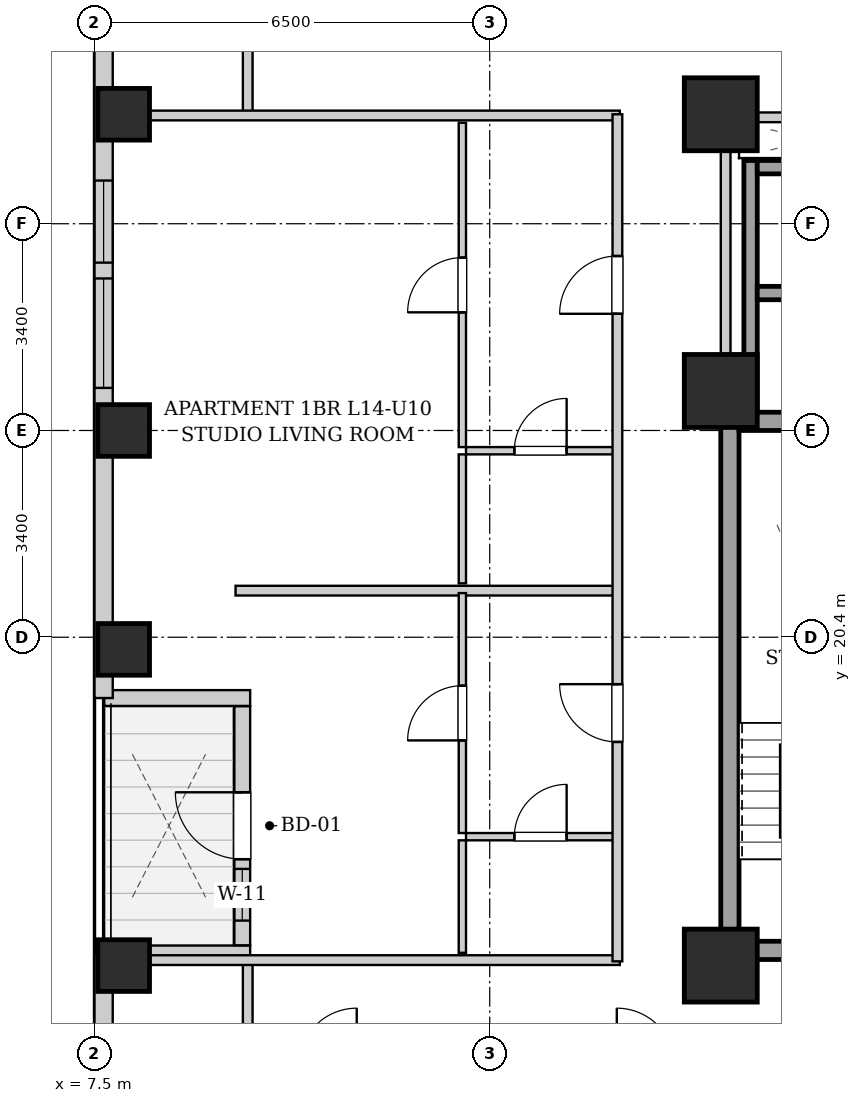
"""IFC4 building model, lengths in metres.
Left out: names, types, materials, properties, quantities, classifications, styles, units other than length and angle.
Written with IfcOpenShell. Run it as: python <this file> out.ifc"""

import sys

from ifc_helpers import new_model, si_unit, direction, frame, frame_2d, origin, origin_2d, place, context, subcontext, project, spatial, rectangle, extrude, element, fill, save


model = new_model("IFC4")
c1 = context("Model", 3, precision=1e-05, world=origin(), true_north=direction((0.0, 1.0)))
c2 = subcontext(c1, "Body", "Model", "MODEL_VIEW")
j1 = project(units=[si_unit("LENGTHUNIT", "METRE"), si_unit("PLANEANGLEUNIT", "RADIAN")], contexts=[c1])
p1 = place(None, origin())
s1 = spatial("IfcSite", under=j1, at=p1, CompositionType="ELEMENT")
p2 = place(p1, origin())
s2 = spatial("IfcBuilding", under=s1, at=p2, CompositionType="ELEMENT")
p3 = place(p2, frame((0.0, 0.0, 54.6)))
s3 = spatial("IfcBuildingStorey", under=s2, at=p3, CompositionType="ELEMENT", Elevation=54.6)
for number, where, z_axis, x_axis in (
    (1, (7.98, 15.0, 0.0), (0.0, 0.0, 1.0), (1.0, 0.0, 0.0)),
    (2, (7.98, 20.2, 0.0), (0.0, 0.0, 1.0), (1.0, 0.0, 0.0)),
    (3, (7.98, 23.8, 0.0), (0.0, 0.0, 1.0), (1.0, 0.0, 0.0)),
    (4, (7.98, 29.0, 0.0), (0.0, 0.0, 1.0), (1.0, 0.0, 0.0)),
):
    element("IfcColumn", number, at=place(p3, frame(where, z_axis=z_axis, x_axis=x_axis)), inside=s3, PredefinedType="COLUMN", context=c2, shape_type="SweptSolid", body=[
        extrude(rectangle(XDim=0.85, YDim=0.85, at=origin_2d()), origin(), (0.0, 0.0, 1.0), 3.2),
    ])
for number, where, z_axis, x_axis in (
    (5, (17.8, 15.0, 0.0), (0.0, 0.0, 1.0), (1.0, 0.0, 0.0)),
    (6, (17.8, 29.0, 0.0), (0.0, 0.0, 1.0), (1.0, 0.0, 0.0)),
    (7, (17.8, 24.45, 0.0), (0.0, 0.0, 1.0), (1.0, 0.0, 0.0)),
):
    element("IfcColumn", number, at=place(p3, frame(where, z_axis=z_axis, x_axis=x_axis)), inside=s3, PredefinedType="COLUMN", context=c2, shape_type="SweptSolid", body=[
        extrude(rectangle(XDim=1.2, YDim=1.2, at=origin_2d()), origin(), (0.0, 0.0, 1.0), 3.2),
    ])
p4 = place(p3, frame((7.65, 2.5, 0.0), z_axis=(0.0, 0.0, 1.0), x_axis=(0.0, 1.0, 0.0)))
e8 = element("IfcWall", 8, at=p4, inside=s3, PredefinedType="SOLIDWALL", context=c2, shape_type="SweptSolid", body=[
    extrude(rectangle(XDim=12.7, YDim=0.3, at=frame_2d((6.35, 0.0))), origin(), (0.0, 0.0, 1.0), 1.975),
])
p5 = place(p4, frame((3.257, 0.0, 0.55)))
e9 = element("IfcOpeningElement", 9, at=p5, cuts=e8, PredefinedType="OPENING", context=c2, shape_type="SweptSolid", body=[
    extrude(rectangle(XDim=1.8, YDim=1.2, at=frame_2d((0.9, 0.6))), frame((0.0, 0.16, 0.0), z_axis=(0.0, -1.0, 0.0), x_axis=(1.0, 0.0, 0.0)), (0.0, 0.0, 1.0), 0.32),
])
p6 = place(p4, frame((1.185, 0.0, 0.55)))
e10 = element("IfcOpeningElement", 10, at=p6, cuts=e8, PredefinedType="OPENING", context=c2, shape_type="SweptSolid", body=[
    extrude(rectangle(XDim=1.35, YDim=1.2, at=frame_2d((0.675, 0.6))), frame((0.0, 0.16, 0.0), z_axis=(0.0, -1.0, 0.0), x_axis=(1.0, 0.0, 0.0)), (0.0, 0.0, 1.0), 0.32),
])
p7 = place(p3, frame((7.66, 15.2, 0.0), z_axis=(0.0, 0.0, 1.0), x_axis=(1.0, 0.0, 0.0)))
e11 = element("IfcWall", 11, at=p7, inside=s3, PredefinedType="SOLIDWALL", context=c2, shape_type="SweptSolid", body=[
    extrude(rectangle(XDim=2.4, YDim=0.26, at=frame_2d((1.2, 0.0))), origin(), (0.0, 0.0, 1.0), 2.94),
])
p8 = place(p3, frame((9.93, 15.334, 0.0), z_axis=(0.0, 0.0, 1.0), x_axis=(0.0, 1.0, 0.0)))
e12 = element("IfcWall", 12, at=p8, inside=s3, PredefinedType="SOLIDWALL", context=c2, shape_type="SweptSolid", body=[
    extrude(rectangle(XDim=3.932, YDim=0.26, at=frame_2d((1.966, 0.0))), origin(), (0.0, 0.0, 1.0), 2.94),
])
p9 = place(p8, frame((1.416, 0.0, 0.0)))
e13 = element("IfcOpeningElement", 13, at=p9, cuts=e12, PredefinedType="OPENING", context=c2, shape_type="SweptSolid", body=[
    extrude(rectangle(XDim=1.1, YDim=2.0, at=frame_2d((0.55, 1.0))), frame((0.0, 0.14, 0.0), z_axis=(0.0, -1.0, 0.0), x_axis=(1.0, 0.0, 0.0)), (0.0, 0.0, 1.0), 0.28),
])
p10 = place(p8, frame((0.406, 0.0, 0.55)))
e14 = element("IfcOpeningElement", 14, at=p10, cuts=e12, PredefinedType="OPENING", context=c2, shape_type="SweptSolid", body=[
    extrude(rectangle(XDim=0.85, YDim=1.2, at=frame_2d((0.425, 0.6))), frame((0.0, 0.14, 0.0), z_axis=(0.0, -1.0, 0.0), x_axis=(1.0, 0.0, 0.0)), (0.0, 0.0, 1.0), 0.28),
])
p11 = place(p3, frame((10.06, 19.4, 0.0), z_axis=(0.0, 0.0, 1.0), x_axis=(-1.0, 0.0, 0.0)))
e15 = element("IfcWall", 15, at=p11, inside=s3, PredefinedType="SOLIDWALL", context=c2, shape_type="SweptSolid", body=[
    extrude(rectangle(XDim=2.4, YDim=0.26, at=frame_2d((1.2, 0.0))), origin(), (0.0, 0.0, 1.0), 2.94),
])
p12 = place(p3, frame((7.65, 19.4, 0.0), z_axis=(0.0, 0.0, 1.0), x_axis=(0.0, 1.0, 0.0)))
e16 = element("IfcWall", 16, at=p12, inside=s3, PredefinedType="SOLIDWALL", context=c2, shape_type="SweptSolid", body=[
    extrude(rectangle(XDim=25.7, YDim=0.3, at=frame_2d((12.85, 0.0))), origin(), (0.0, 0.0, 1.0), 1.975),
])
p13 = place(p12, frame((20.185, 0.0, 0.55)))
e17 = element("IfcOpeningElement", 17, at=p13, cuts=e16, PredefinedType="OPENING", context=c2, shape_type="SweptSolid", body=[
    extrude(rectangle(XDim=1.8, YDim=1.2, at=frame_2d((0.9, 0.6))), frame((0.0, 0.16, 0.0), z_axis=(0.0, -1.0, 0.0), x_axis=(1.0, 0.0, 0.0)), (0.0, 0.0, 1.0), 0.32),
])
p14 = place(p12, frame((14.585, 0.0, 0.55)))
e18 = element("IfcOpeningElement", 18, at=p14, cuts=e16, PredefinedType="OPENING", context=c2, shape_type="SweptSolid", body=[
    extrude(rectangle(XDim=1.35, YDim=1.2, at=frame_2d((0.675, 0.6))), frame((0.0, 0.16, 0.0), z_axis=(0.0, -1.0, 0.0), x_axis=(1.0, 0.0, 0.0)), (0.0, 0.0, 1.0), 0.32),
])
p15 = place(p12, frame((5.1, 0.0, 0.55)))
e19 = element("IfcOpeningElement", 19, at=p15, cuts=e16, PredefinedType="OPENING", context=c2, shape_type="SweptSolid", body=[
    extrude(rectangle(XDim=1.8, YDim=1.2, at=frame_2d((0.9, 0.6))), frame((0.0, 0.16, 0.0), z_axis=(0.0, -1.0, 0.0), x_axis=(1.0, 0.0, 0.0)), (0.0, 0.0, 1.0), 0.32),
])
p16 = place(p12, frame((7.16, 0.0, 0.55)))
e20 = element("IfcOpeningElement", 20, at=p16, cuts=e16, PredefinedType="OPENING", context=c2, shape_type="SweptSolid", body=[
    extrude(rectangle(XDim=1.35, YDim=1.2, at=frame_2d((0.675, 0.6))), frame((0.0, 0.16, 0.0), z_axis=(0.0, -1.0, 0.0), x_axis=(1.0, 0.0, 0.0)), (0.0, 0.0, 1.0), 0.32),
])
p17 = place(p3, frame((17.95, 15.1, 0.0), z_axis=(0.0, 0.0, 1.0), x_axis=(0.0, 1.0, 0.0)))
e21 = element("IfcWall", 21, at=p17, inside=s3, PredefinedType="SHEAR", context=c2, shape_type="SweptSolid", body=[
    extrude(rectangle(XDim=9.0, YDim=0.3, at=frame_2d((4.5, 0.0))), origin(), (0.0, 0.0, 1.0), 2.94),
])
p18 = place(p3, frame((18.1, 23.95, 0.0), z_axis=(0.0, 0.0, 1.0), x_axis=(1.0, 0.0, 0.0)))
e22 = element("IfcWall", 22, at=p18, inside=s3, PredefinedType="SHEAR", context=c2, shape_type="SweptSolid", body=[
    extrude(rectangle(XDim=2.85, YDim=0.3, at=frame_2d((1.425, 0.0))), origin(), (0.0, 0.0, 1.0), 2.94),
])
p19 = place(p3, frame((18.1, 15.25, 0.0), z_axis=(0.0, 0.0, 1.0), x_axis=(1.0, 0.0, 0.0)))
e23 = element("IfcWall", 23, at=p19, inside=s3, PredefinedType="SHEAR", context=c2, shape_type="SweptSolid", body=[
    extrude(rectangle(XDim=2.85, YDim=0.3, at=frame_2d((1.425, 0.0))), origin(), (0.0, 0.0, 1.0), 2.94),
])
p20 = place(p19, frame((0.86, 0.0, 0.0)))
e24 = element("IfcOpeningElement", 24, at=p20, cuts=e23, PredefinedType="OPENING", context=c2, shape_type="SweptSolid", body=[
    extrude(rectangle(XDim=1.1, YDim=2.05, at=frame_2d((0.55, 1.025))), frame((0.0, 0.16, 0.0), z_axis=(0.0, -1.0, 0.0), x_axis=(1.0, 0.0, 0.0)), (0.0, 0.0, 1.0), 0.32),
])
p21 = place(p3, frame((18.29, 24.1, 0.0), z_axis=(0.0, 0.0, 1.0), x_axis=(0.0, 1.0, 0.0)))
e25 = element("IfcWall", 25, at=p21, inside=s3, PredefinedType="SHEAR", context=c2, shape_type="SweptSolid", body=[
    extrude(rectangle(XDim=4.14, YDim=0.22, at=frame_2d((2.07, 0.0))), origin(), (0.0, 0.0, 1.0), 2.94),
])
for number, where, z_axis, x_axis in (
    (26, (18.4, 26.06, 0.0), (0.0, 0.0, 1.0), (1.0, 0.0, 0.0)),
    (27, (18.4, 28.13, 0.0), (0.0, 0.0, 1.0), (1.0, 0.0, 0.0)),
):
    element("IfcWall", number, at=place(p3, frame(where, z_axis=z_axis, x_axis=x_axis)), inside=s3, PredefinedType="SHEAR", context=c2, shape_type="SweptSolid", body=[
        extrude(rectangle(XDim=1.9, YDim=0.22, at=frame_2d((0.95, 0.0))), origin(), (0.0, 0.0, 1.0), 2.94),
    ])
p22 = place(p3, frame((17.88, 24.12, 0.0), z_axis=(0.0, 0.0, 1.0), x_axis=(0.0, 1.0, 0.0)))
e28 = element("IfcWall", 28, at=p22, inside=s3, PredefinedType="PARTITIONING", context=c2, shape_type="SweptSolid", body=[
    extrude(rectangle(XDim=4.76, YDim=0.16, at=frame_2d((2.38, 0.0))), origin(), (0.0, 0.0, 1.0), 2.94),
])
p23 = place(p3, frame((17.96, 28.95, 0.0), z_axis=(0.0, 0.0, 1.0), x_axis=(1.0, 0.0, 0.0)))
e29 = element("IfcWall", 29, at=p23, inside=s3, PredefinedType="PARTITIONING", context=c2, shape_type="SweptSolid", body=[
    extrude(rectangle(XDim=4.29, YDim=0.16, at=frame_2d((2.145, 0.0))), origin(), (0.0, 0.0, 1.0), 2.232),
])
p24 = place(p23, frame((1.57, 0.0, 0.0)))
e30 = element("IfcOpeningElement", 30, at=p24, cuts=e29, PredefinedType="OPENING", context=c2, shape_type="SweptSolid", body=[
    extrude(rectangle(XDim=0.86, YDim=2.05, at=frame_2d((0.43, 1.025))), frame((0.0, 0.09, 0.0), z_axis=(0.0, -1.0, 0.0), x_axis=(1.0, 0.0, 0.0)), (0.0, 0.0, 1.0), 0.18),
])
for number, where, z_axis, x_axis in (
    (31, (10.02, 13.35, 0.0), (0.0, 0.0, 1.0), (0.0, 1.0, 0.0)),
    (32, (10.02, 28.98, 0.0), (0.0, 0.0, 1.0), (0.0, 1.0, 0.0)),
):
    element("IfcWall", number, at=place(p3, frame(where, z_axis=z_axis, x_axis=x_axis)), inside=s3, PredefinedType="PARTITIONING", context=c2, shape_type="SweptSolid", body=[
        extrude(rectangle(XDim=1.74, YDim=0.16, at=frame_2d((0.87, 0.0))), origin(), (0.0, 0.0, 1.0), 2.94),
    ])
for number, where, z_axis, x_axis in (
    (33, (7.78, 15.09, 0.0), (0.0, 0.0, 1.0), (1.0, 0.0, 0.0)),
    (34, (7.78, 28.98, 0.0), (0.0, 0.0, 1.0), (1.0, 0.0, 0.0)),
):
    element("IfcWall", number, at=place(p3, frame(where, z_axis=z_axis, x_axis=x_axis)), inside=s3, PredefinedType="PARTITIONING", context=c2, shape_type="SweptSolid", body=[
        extrude(rectangle(XDim=8.36, YDim=0.16, at=frame_2d((4.18, 0.0))), origin(), (0.0, 0.0, 1.0), 2.232),
    ])
p25 = place(p3, frame((9.82, 21.166, 0.0), z_axis=(0.0, 0.0, 1.0), x_axis=(1.0, 0.0, 0.0)))
e35 = element("IfcWall", 35, at=p25, inside=s3, PredefinedType="PARTITIONING", context=c2, shape_type="SweptSolid", body=[
    extrude(rectangle(XDim=6.24, YDim=0.16, at=frame_2d((3.12, 0.0))), origin(), (0.0, 0.0, 1.0), 2.94),
])
p26 = place(p3, frame((13.61, 17.12, 0.0), z_axis=(0.0, 0.0, 1.0), x_axis=(1.0, 0.0, 0.0)))
e36 = element("IfcWall", 36, at=p26, inside=s3, PredefinedType="PARTITIONING", context=c2, shape_type="SweptSolid", body=[
    extrude(rectangle(XDim=2.45, YDim=0.12, at=frame_2d((1.225, 0.0))), origin(), (0.0, 0.0, 1.0), 2.94),
])
p27 = place(p26, frame((0.795, 0.0, 0.0)))
e37 = element("IfcOpeningElement", 37, at=p27, cuts=e36, PredefinedType="OPENING", context=c2, shape_type="SweptSolid", body=[
    extrude(rectangle(XDim=0.86, YDim=2.05, at=frame_2d((0.43, 1.025))), frame((0.0, 0.07, 0.0), z_axis=(0.0, -1.0, 0.0), x_axis=(1.0, 0.0, 0.0)), (0.0, 0.0, 1.0), 0.14),
])
p28 = place(p3, frame((13.55, 15.21, 0.0), z_axis=(0.0, 0.0, 1.0), x_axis=(0.0, 1.0, 0.0)))
e38 = element("IfcWall", 38, at=p28, inside=s3, PredefinedType="PARTITIONING", context=c2, shape_type="SweptSolid", body=[
    extrude(rectangle(XDim=1.85, YDim=0.12, at=frame_2d((0.925, 0.0))), origin(), (0.0, 0.0, 1.0), 2.94),
])
p29 = place(p3, frame((13.55, 17.18, 0.0), z_axis=(0.0, 0.0, 1.0), x_axis=(0.0, 1.0, 0.0)))
e39 = element("IfcWall", 39, at=p29, inside=s3, PredefinedType="PARTITIONING", context=c2, shape_type="SweptSolid", body=[
    extrude(rectangle(XDim=3.946, YDim=0.12, at=frame_2d((1.973, 0.0))), origin(), (0.0, 0.0, 1.0), 2.94),
])
p30 = place(p29, frame((1.523, 0.0, 0.0)))
e40 = element("IfcOpeningElement", 40, at=p30, cuts=e39, PredefinedType="OPENING", context=c2, shape_type="SweptSolid", body=[
    extrude(rectangle(XDim=0.9, YDim=2.05, at=frame_2d((0.45, 1.025))), frame((0.0, 0.07, 0.0), z_axis=(0.0, -1.0, 0.0), x_axis=(1.0, 0.0, 0.0)), (0.0, 0.0, 1.0), 0.14),
])
p31 = place(p3, frame((13.61, 23.467, 0.0), z_axis=(0.0, 0.0, 1.0), x_axis=(1.0, 0.0, 0.0)))
e41 = element("IfcWall", 41, at=p31, inside=s3, PredefinedType="PARTITIONING", context=c2, shape_type="SweptSolid", body=[
    extrude(rectangle(XDim=2.45, YDim=0.12, at=frame_2d((1.225, 0.0))), origin(), (0.0, 0.0, 1.0), 2.94),
])
p32 = place(p31, frame((0.795, 0.0, 0.0)))
e42 = element("IfcOpeningElement", 42, at=p32, cuts=e41, PredefinedType="OPENING", context=c2, shape_type="SweptSolid", body=[
    extrude(rectangle(XDim=0.86, YDim=2.05, at=frame_2d((0.43, 1.025))), frame((0.0, 0.07, 0.0), z_axis=(0.0, -1.0, 0.0), x_axis=(1.0, 0.0, 0.0)), (0.0, 0.0, 1.0), 0.14),
])
p33 = place(p3, frame((13.55, 21.286, 0.0), z_axis=(0.0, 0.0, 1.0), x_axis=(0.0, 1.0, 0.0)))
e43 = element("IfcWall", 43, at=p33, inside=s3, PredefinedType="PARTITIONING", context=c2, shape_type="SweptSolid", body=[
    extrude(rectangle(XDim=2.121, YDim=0.12, at=frame_2d((1.061, 0.0))), origin(), (0.0, 0.0, 1.0), 2.94),
])
p34 = place(p3, frame((13.55, 23.527, 0.0), z_axis=(0.0, 0.0, 1.0), x_axis=(0.0, 1.0, 0.0)))
e44 = element("IfcWall", 44, at=p34, inside=s3, PredefinedType="PARTITIONING", context=c2, shape_type="SweptSolid", body=[
    extrude(rectangle(XDim=5.333, YDim=0.12, at=frame_2d((2.667, 0.0))), origin(), (0.0, 0.0, 1.0), 2.94),
])
p35 = place(p34, frame((2.216, 0.0, 0.0)))
e45 = element("IfcOpeningElement", 45, at=p35, cuts=e44, PredefinedType="OPENING", context=c2, shape_type="SweptSolid", body=[
    extrude(rectangle(XDim=0.9, YDim=2.05, at=frame_2d((0.45, 1.025))), frame((0.0, 0.07, 0.0), z_axis=(0.0, -1.0, 0.0), x_axis=(1.0, 0.0, 0.0)), (0.0, 0.0, 1.0), 0.14),
])
p36 = place(p3, frame((16.1, 15.07, 0.0), z_axis=(0.0, 0.0, 1.0), x_axis=(0.0, 1.0, 0.0)))
e46 = element("IfcWall", 46, at=p36, inside=s3, PredefinedType="PARTITIONING", context=c2, shape_type="SweptSolid", body=[
    extrude(rectangle(XDim=13.93, YDim=0.16, at=frame_2d((6.965, 0.0))), origin(), (0.0, 0.0, 1.0), 2.94),
])
p37 = place(p36, frame((3.608, 0.0, 0.0)))
e47 = element("IfcOpeningElement", 47, at=p37, cuts=e46, PredefinedType="OPENING", context=c2, shape_type="SweptSolid", body=[
    extrude(rectangle(XDim=0.95, YDim=2.1, at=frame_2d((0.475, 1.05))), frame((0.0, 0.09, 0.0), z_axis=(0.0, -1.0, 0.0), x_axis=(1.0, 0.0, 0.0)), (0.0, 0.0, 1.0), 0.18),
])
p38 = place(p36, frame((10.649, 0.0, 0.0)))
e48 = element("IfcOpeningElement", 48, at=p38, cuts=e46, PredefinedType="OPENING", context=c2, shape_type="SweptSolid", body=[
    extrude(rectangle(XDim=0.95, YDim=2.1, at=frame_2d((0.475, 1.05))), frame((0.0, 0.09, 0.0), z_axis=(0.0, -1.0, 0.0), x_axis=(1.0, 0.0, 0.0)), (0.0, 0.0, 1.0), 0.18),
])
p39 = place(p27, origin())
e49 = element("IfcDoor", 49, at=p39, inside=s3, OperationType="SINGLE_SWING_RIGHT", PredefinedType="DOOR", context=c2, shape_type="SweptSolid", body=[
    extrude(rectangle(XDim=0.86, YDim=2.05, at=frame_2d((0.43, 1.025))), frame((0.0, 0.025, 0.0), z_axis=(0.0, -1.0, 0.0), x_axis=(1.0, 0.0, 0.0)), (0.0, 0.0, 1.0), 0.05),
])
fill(e37, e49)
p40 = place(p30, origin())
e50 = element("IfcDoor", 50, at=p40, inside=s3, OperationType="SINGLE_SWING_LEFT", PredefinedType="DOOR", context=c2, shape_type="SweptSolid", body=[
    extrude(rectangle(XDim=0.9, YDim=2.05, at=frame_2d((0.45, 1.025))), frame((0.0, 0.025, 0.0), z_axis=(0.0, -1.0, 0.0), x_axis=(1.0, 0.0, 0.0)), (0.0, 0.0, 1.0), 0.05),
])
fill(e40, e50)
p41 = place(p32, origin())
e51 = element("IfcDoor", 51, at=p41, inside=s3, OperationType="SINGLE_SWING_RIGHT", PredefinedType="DOOR", context=c2, shape_type="SweptSolid", body=[
    extrude(rectangle(XDim=0.86, YDim=2.05, at=frame_2d((0.43, 1.025))), frame((0.0, 0.025, 0.0), z_axis=(0.0, -1.0, 0.0), x_axis=(1.0, 0.0, 0.0)), (0.0, 0.0, 1.0), 0.05),
])
fill(e42, e51)
p42 = place(p35, origin())
e52 = element("IfcDoor", 52, at=p42, inside=s3, OperationType="SINGLE_SWING_LEFT", PredefinedType="DOOR", context=c2, shape_type="SweptSolid", body=[
    extrude(rectangle(XDim=0.9, YDim=2.05, at=frame_2d((0.45, 1.025))), frame((0.0, 0.025, 0.0), z_axis=(0.0, -1.0, 0.0), x_axis=(1.0, 0.0, 0.0)), (0.0, 0.0, 1.0), 0.05),
])
fill(e45, e52)
p43 = place(p37, origin())
e53 = element("IfcDoor", 53, at=p43, inside=s3, OperationType="SINGLE_SWING_RIGHT", PredefinedType="DOOR", context=c2, shape_type="SweptSolid", body=[
    extrude(rectangle(XDim=0.95, YDim=2.1, at=frame_2d((0.475, 1.05))), frame((0.0, 0.025, 0.0), z_axis=(0.0, -1.0, 0.0), x_axis=(1.0, 0.0, 0.0)), (0.0, 0.0, 1.0), 0.05),
])
fill(e47, e53)
p44 = place(p38, origin())
e54 = element("IfcDoor", 54, at=p44, inside=s3, OperationType="SINGLE_SWING_LEFT", PredefinedType="DOOR", context=c2, shape_type="SweptSolid", body=[
    extrude(rectangle(XDim=0.95, YDim=2.1, at=frame_2d((0.475, 1.05))), frame((0.0, 0.025, 0.0), z_axis=(0.0, -1.0, 0.0), x_axis=(1.0, 0.0, 0.0)), (0.0, 0.0, 1.0), 0.05),
])
fill(e48, e54)
p45 = place(p9, origin())
e55 = element("IfcDoor", 55, at=p45, inside=s3, OperationType="SINGLE_SWING_RIGHT", PredefinedType="DOOR", context=c2, shape_type="SweptSolid", body=[
    extrude(rectangle(XDim=1.1, YDim=2.0, at=frame_2d((0.55, 1.0))), frame((0.0, 0.025, 0.0), z_axis=(0.0, -1.0, 0.0), x_axis=(1.0, 0.0, 0.0)), (0.0, 0.0, 1.0), 0.05),
])
fill(e13, e55)
p46 = place(p10, origin())
e56 = element("IfcWindow", 56, at=p46, inside=s3, PartitioningType="SINGLE_PANEL", PredefinedType="WINDOW", context=c2, shape_type="SweptSolid", body=[
    extrude(rectangle(XDim=0.85, YDim=1.2, at=frame_2d((0.425, 0.6))), frame((0.0, 0.03, 0.0), z_axis=(0.0, -1.0, 0.0), x_axis=(1.0, 0.0, 0.0)), (0.0, 0.0, 1.0), 0.06),
])
fill(e14, e56)
p47 = place(p15, origin())
e57 = element("IfcWindow", 57, at=p47, inside=s3, PartitioningType="DOUBLE_PANEL_VERTICAL", PredefinedType="WINDOW", context=c2, shape_type="SweptSolid", body=[
    extrude(rectangle(XDim=1.8, YDim=1.2, at=frame_2d((0.9, 0.6))), frame((0.0, 0.03, 0.0), z_axis=(0.0, -1.0, 0.0), x_axis=(1.0, 0.0, 0.0)), (0.0, 0.0, 1.0), 0.06),
])
fill(e19, e57)
p48 = place(p16, origin())
e58 = element("IfcWindow", 58, at=p48, inside=s3, PartitioningType="SINGLE_PANEL", PredefinedType="WINDOW", context=c2, shape_type="SweptSolid", body=[
    extrude(rectangle(XDim=1.35, YDim=1.2, at=frame_2d((0.675, 0.6))), frame((0.0, 0.03, 0.0), z_axis=(0.0, -1.0, 0.0), x_axis=(1.0, 0.0, 0.0)), (0.0, 0.0, 1.0), 0.06),
])
fill(e20, e58)
save(model, sys.argv[1])
